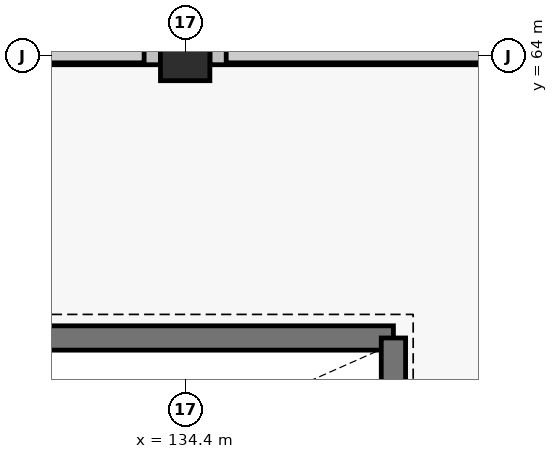
"""IFC4 building model, lengths in metres.
Left out: names, types, materials, properties, quantities, classifications, styles, units other than length and angle.
Written with IfcOpenShell. Run it as: python <this file> out.ifc"""

import sys

from ifc_helpers import new_model, si_unit, direction, frame, frame_2d, origin, origin_2d, place, context, subcontext, project, spatial, rectangle, extrude, element, save


model = new_model("IFC4")
c1 = context("Model", 3, precision=1e-05, world=origin(), true_north=direction((0.0, 1.0)))
c2 = subcontext(c1, "Body", "Model", "MODEL_VIEW")
j1 = project(units=[si_unit("LENGTHUNIT", "METRE"), si_unit("PLANEANGLEUNIT", "RADIAN")], contexts=[c1])
p1 = place(None, origin())
s1 = spatial("IfcSite", under=j1, at=p1, CompositionType="ELEMENT")
p2 = place(p1, origin())
s2 = spatial("IfcBuilding", under=s1, at=p2, CompositionType="ELEMENT")
p3 = place(p2, frame((0.0, 0.0, 13.12)))
s3 = spatial("IfcBuildingStorey", under=s2, at=p3, CompositionType="ELEMENT", Elevation=13.12)
p4 = place(p3, frame((134.4, 64.0, 0.0), z_axis=(0.0, 0.0, 1.0), x_axis=(1.0, 0.0, 0.0)))
e1 = element("IfcColumn", 1, at=p4, inside=s3, PredefinedType="COLUMN", context=c2, shape_type="SweptSolid", body=[
    extrude(rectangle(XDim=0.65, YDim=0.65, at=origin_2d()), origin(), (0.0, 0.0, 1.0), 3.2),
])
for number, where, z_axis, x_axis in (
    (2, (126.325, 64.0, 0.0), (0.0, 0.0, 1.0), (1.0, 0.0, 0.0)),
    (3, (134.725, 64.0, 0.0), (0.0, 0.0, 1.0), (1.0, 0.0, 0.0)),
):
    element("IfcWall", number, at=place(p3, frame(where, z_axis=z_axis, x_axis=x_axis)), inside=s3, PredefinedType="PARAPET", context=c2, shape_type="SweptSolid", body=[
        extrude(rectangle(XDim=7.75, YDim=0.23, at=frame_2d((3.875, 0.0))), origin(), (0.0, 0.0, 1.0), 1.15),
    ])
p5 = place(p3, frame((128.26, 60.29, 0.0), z_axis=(0.0, 0.0, 1.0), x_axis=(1.0, 0.0, 0.0)))
e4 = element("IfcWall", 4, at=p5, inside=s3, PredefinedType="SHEAR", context=c2, shape_type="SweptSolid", body=[
    extrude(rectangle(XDim=8.88, YDim=0.32, at=frame_2d((4.44, 0.0))), origin(), (0.0, 0.0, 1.0), 3.2),
])
p6 = place(p3, frame((137.14, 56.86, 0.0), z_axis=(0.0, 0.0, 1.0), x_axis=(0.0, 1.0, 0.0)))
e5 = element("IfcWall", 5, at=p6, inside=s3, PredefinedType="SHEAR", context=c2, shape_type="SweptSolid", body=[
    extrude(rectangle(XDim=3.43, YDim=0.32, at=frame_2d((1.715, 0.0))), origin(), (0.0, 0.0, 1.0), 3.2),
])
save(model, sys.argv[1])
